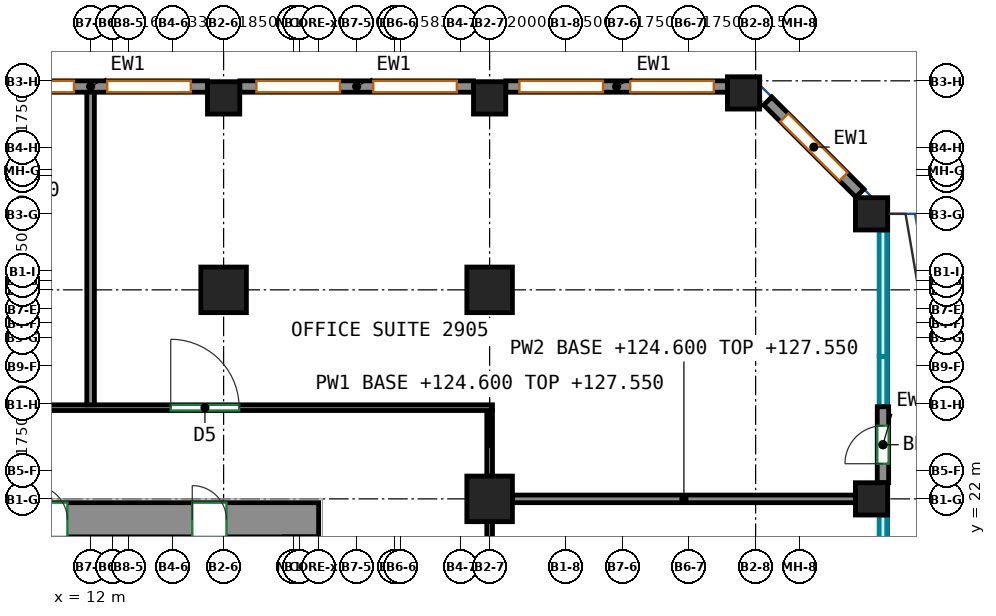
"""IFC4 building model, lengths in metres.
Left out: names, types, materials, properties, quantities, classifications, styles, units other than length and angle.
Written with IfcOpenShell. Run it as: python <this file> out.ifc"""

import sys

from ifc_helpers import new_model, si_unit, direction, frame, frame_2d, origin, origin_2d, place, context, subcontext, project, spatial, rectangle, extrude, source, transform, mapped, element, fill, save


model = new_model("IFC4")
c1 = context("Model", 3, precision=1e-05, world=origin(), true_north=direction((0.0, 1.0)))
c2 = subcontext(c1, "Body", "Model", "MODEL_VIEW")
j1 = project(units=[si_unit("LENGTHUNIT", "METRE"), si_unit("PLANEANGLEUNIT", "RADIAN")], contexts=[c1])
p1 = place(None, origin())
s1 = spatial("IfcSite", under=j1, at=p1, CompositionType="ELEMENT")
p2 = place(p1, origin())
s2 = spatial("IfcBuilding", under=s1, at=p2, CompositionType="ELEMENT")
p3 = place(p2, frame((0.0, 0.0, 124.6)))
s3 = spatial("IfcBuildingStorey", under=s2, at=p3, CompositionType="ELEMENT", Elevation=124.6)
m1 = source(origin(), c2, "Body", "SweptSolid", [
    extrude(rectangle(XDim=1.2, YDim=1.2, at=origin_2d()), origin(), (0.0, 0.0, 1.0), 3.6),
])
p4 = place(p3, frame((15.5, 27.5, 0.0), z_axis=(0.0, 0.0, 1.0), x_axis=(1.0, 0.0, 0.0)))
e1 = element("IfcColumn", 1, at=p4, inside=s3, PredefinedType="COLUMN", context=c2, shape_type="MappedRepresentation", body=[
    mapped(m1, transform((0.0, 0.0, 0.0))),
])
m2 = source(origin(), c2, "Body", "SweptSolid", [
    extrude(rectangle(XDim=0.85, YDim=0.85, at=origin_2d()), origin(), (0.0, 0.0, 1.0), 3.6),
])
p5 = place(p3, frame((15.5, 32.55, 0.0), z_axis=(0.0, 0.0, 1.0), x_axis=(1.0, 0.0, 0.0)))
e2 = element("IfcColumn", 2, at=p5, inside=s3, PredefinedType="COLUMN", context=c2, shape_type="MappedRepresentation", body=[
    mapped(m2, transform((0.0, 0.0, 0.0))),
])
for number, where, z_axis, x_axis in (
    (3, (22.5, 22.0, 0.0), (0.0, 0.0, 1.0), (1.0, 0.0, 0.0)),
    (4, (22.5, 27.5, 0.0), (0.0, 0.0, 1.0), (1.0, 0.0, 0.0)),
):
    element("IfcColumn", number, at=place(p3, frame(where, z_axis=z_axis, x_axis=x_axis)), inside=s3, PredefinedType="COLUMN", context=c2, shape_type="MappedRepresentation", body=[
        mapped(m1, transform((0.0, 0.0, 0.0))),
    ])
for number, where, z_axis, x_axis in (
    (5, (22.5, 32.55, 0.0), (0.0, 0.0, 1.0), (1.0, 0.0, 0.0)),
    (6, (29.182, 32.682, 0.0), (0.0, 0.0, 1.0), (1.0, 0.0, 0.0)),
    (7, (32.55, 22.0, 0.0), (0.0, 0.0, 1.0), (1.0, 0.0, 0.0)),
    (8, (32.55, 29.5, 0.0), (0.0, 0.0, 1.0), (1.0, 0.0, 0.0)),
):
    element("IfcColumn", number, at=place(p3, frame(where, z_axis=z_axis, x_axis=x_axis)), inside=s3, PredefinedType="COLUMN", context=c2, shape_type="MappedRepresentation", body=[
        mapped(m2, transform((0.0, 0.0, 0.0))),
    ])
m3 = source(origin(), c2, "Body", "SweptSolid", [
    extrude(rectangle(XDim=33.9, YDim=0.9, at=frame_2d((16.95, 0.0))), origin(), (0.0, 0.0, 1.0), 3.6),
])
p6 = place(p3, frame((-15.9, 21.45, 0.0), z_axis=(0.0, 0.0, 1.0), x_axis=(1.0, 0.0, 0.0)))
e9 = element("IfcWall", 9, at=p6, inside=s3, PredefinedType="SHEAR", context=c2, shape_type="MappedRepresentation", body=[
    mapped(m3, transform((0.0, 0.0, 0.0))),
])
p7 = place(p6, frame((6.008, 0.0, 0.0)))
e10 = element("IfcOpeningElement", 10, at=p7, cuts=e9, PredefinedType="OPENING", context=c2, shape_type="SweptSolid", body=[
    extrude(rectangle(XDim=0.9, YDim=2.1, at=frame_2d((0.45, 1.05))), frame((0.0, 0.46, 0.0), z_axis=(0.0, -1.0, 0.0), x_axis=(1.0, 0.0, 0.0)), (0.0, 0.0, 1.0), 0.92),
])
p8 = place(p6, frame((8.688, 0.0, 0.0)))
e11 = element("IfcOpeningElement", 11, at=p8, cuts=e9, PredefinedType="OPENING", context=c2, shape_type="SweptSolid", body=[
    extrude(rectangle(XDim=0.9, YDim=2.1, at=frame_2d((0.45, 1.05))), frame((0.0, 0.46, 0.0), z_axis=(0.0, -1.0, 0.0), x_axis=(1.0, 0.0, 0.0)), (0.0, 0.0, 1.0), 0.92),
])
p9 = place(p6, frame((12.185, 0.0, 0.0)))
e12 = element("IfcOpeningElement", 12, at=p9, cuts=e9, PredefinedType="OPENING", context=c2, shape_type="SweptSolid", body=[
    extrude(rectangle(XDim=0.9, YDim=2.1, at=frame_2d((0.45, 1.05))), frame((0.0, 0.46, 0.0), z_axis=(0.0, -1.0, 0.0), x_axis=(1.0, 0.0, 0.0)), (0.0, 0.0, 1.0), 0.92),
])
p10 = place(p6, frame((16.138, 0.0, 0.0)))
e13 = element("IfcOpeningElement", 13, at=p10, cuts=e9, PredefinedType="OPENING", context=c2, shape_type="SweptSolid", body=[
    extrude(rectangle(XDim=0.9, YDim=2.1, at=frame_2d((0.45, 1.05))), frame((0.0, 0.46, 0.0), z_axis=(0.0, -1.0, 0.0), x_axis=(1.0, 0.0, 0.0)), (0.0, 0.0, 1.0), 0.92),
])
p11 = place(p6, frame((20.962, 0.0, 0.0)))
e14 = element("IfcOpeningElement", 14, at=p11, cuts=e9, PredefinedType="OPENING", context=c2, shape_type="SweptSolid", body=[
    extrude(rectangle(XDim=0.9, YDim=2.1, at=frame_2d((0.45, 1.05))), frame((0.0, 0.46, 0.0), z_axis=(0.0, -1.0, 0.0), x_axis=(1.0, 0.0, 0.0)), (0.0, 0.0, 1.0), 0.92),
])
p12 = place(p6, frame((26.389, 0.0, 0.0)))
e15 = element("IfcOpeningElement", 15, at=p12, cuts=e9, PredefinedType="OPENING", context=c2, shape_type="SweptSolid", body=[
    extrude(rectangle(XDim=0.9, YDim=2.1, at=frame_2d((0.45, 1.05))), frame((0.0, 0.46, 0.0), z_axis=(0.0, -1.0, 0.0), x_axis=(1.0, 0.0, 0.0)), (0.0, 0.0, 1.0), 0.92),
])
p13 = place(p6, frame((2.425, 0.0, 0.0)))
e16 = element("IfcOpeningElement", 16, at=p13, cuts=e9, PredefinedType="OPENING", context=c2, shape_type="SweptSolid", body=[
    extrude(rectangle(XDim=0.9, YDim=2.1, at=frame_2d((0.45, 1.05))), frame((0.0, 0.46, 0.0), z_axis=(0.0, -1.0, 0.0), x_axis=(1.0, 0.0, 0.0)), (0.0, 0.0, 1.0), 0.92),
])
p14 = place(p6, frame((30.575, 0.0, 0.0)))
e17 = element("IfcOpeningElement", 17, at=p14, cuts=e9, PredefinedType="OPENING", context=c2, shape_type="SweptSolid", body=[
    extrude(rectangle(XDim=0.9, YDim=2.1, at=frame_2d((0.45, 1.05))), frame((0.0, 0.46, 0.0), z_axis=(0.0, -1.0, 0.0), x_axis=(1.0, 0.0, 0.0)), (0.0, 0.0, 1.0), 0.92),
])
m4 = source(origin(), c2, "Body", "SweptSolid", [
    extrude(rectangle(XDim=2.0, YDim=0.3, at=frame_2d((1.0, 0.0))), origin(), (0.0, 0.0, 1.0), 3.6),
])
p15 = place(p3, frame((32.85, 22.425, 0.0), z_axis=(0.0, 0.0, 1.0), x_axis=(0.0, 1.0, 0.0)))
e18 = element("IfcWall", 18, at=p15, inside=s3, PredefinedType="SOLIDWALL", context=c2, shape_type="MappedRepresentation", body=[
    mapped(m4, transform((0.0, 0.0, 0.0))),
])
p16 = place(p15, frame((0.5, 0.0, 0.0)))
e19 = element("IfcOpeningElement", 19, at=p16, cuts=e18, PredefinedType="OPENING", context=c2, shape_type="SweptSolid", body=[
    extrude(rectangle(XDim=1.0, YDim=2.1, at=frame_2d((0.5, 1.05))), frame((0.0, 0.16, 0.0), z_axis=(0.0, -1.0, 0.0), x_axis=(1.0, 0.0, 0.0)), (0.0, 0.0, 1.0), 0.32),
])
m5 = source(origin(), c2, "Body", "SweptSolid", [
    extrude(rectangle(XDim=3.429, YDim=0.3, at=frame_2d((1.715, 0.0))), origin(), (0.0, 0.0, 1.0), 3.6),
])
p17 = place(p3, frame((32.244, 30.044, 0.0), z_axis=(0.0, 0.0, 1.0), x_axis=(-0.707106781187, 0.707106781187, 0.0)))
e20 = element("IfcWall", 20, at=p17, inside=s3, PredefinedType="SOLIDWALL", context=c2, shape_type="MappedRepresentation", body=[
    mapped(m5, transform((0.0, 0.0, 0.0))),
])
p18 = place(p17, frame((0.615, 0.0, 0.7)))
e21 = element("IfcOpeningElement", 21, at=p18, cuts=e20, PredefinedType="OPENING", context=c2, shape_type="SweptSolid", body=[
    extrude(rectangle(XDim=2.2, YDim=2.25, at=frame_2d((1.1, 1.125))), frame((0.0, 0.16, 0.0), z_axis=(0.0, -1.0, 0.0), x_axis=(1.0, 0.0, 0.0)), (0.0, 0.0, 1.0), 0.32),
])
m6 = source(origin(), c2, "Body", "SweptSolid", [
    extrude(rectangle(XDim=5.832, YDim=0.3, at=frame_2d((2.916, 0.0))), origin(), (0.0, 0.0, 1.0), 3.6),
])
p19 = place(p3, frame((28.757, 32.85, 0.0), z_axis=(0.0, 0.0, 1.0), x_axis=(-1.0, 0.0, 0.0)))
e22 = element("IfcWall", 22, at=p19, inside=s3, PredefinedType="SOLIDWALL", context=c2, shape_type="MappedRepresentation", body=[
    mapped(m6, transform((0.0, 0.0, 0.0))),
])
p20 = place(p19, frame((0.358, 0.0, 0.7)))
e23 = element("IfcOpeningElement", 23, at=p20, cuts=e22, PredefinedType="OPENING", context=c2, shape_type="SweptSolid", body=[
    extrude(rectangle(XDim=2.2, YDim=2.25, at=frame_2d((1.1, 1.125))), frame((0.0, 0.16, 0.0), z_axis=(0.0, -1.0, 0.0), x_axis=(1.0, 0.0, 0.0)), (0.0, 0.0, 1.0), 0.32),
])
p21 = place(p19, frame((3.274, 0.0, 0.7)))
e24 = element("IfcOpeningElement", 24, at=p21, cuts=e22, PredefinedType="OPENING", context=c2, shape_type="SweptSolid", body=[
    extrude(rectangle(XDim=2.2, YDim=2.25, at=frame_2d((1.1, 1.125))), frame((0.0, 0.16, 0.0), z_axis=(0.0, -1.0, 0.0), x_axis=(1.0, 0.0, 0.0)), (0.0, 0.0, 1.0), 0.32),
])
m7 = source(origin(), c2, "Body", "SweptSolid", [
    extrude(rectangle(XDim=6.15, YDim=0.3, at=frame_2d((3.075, 0.0))), origin(), (0.0, 0.0, 1.0), 3.6),
])
p22 = place(p3, frame((22.075, 32.85, 0.0), z_axis=(0.0, 0.0, 1.0), x_axis=(-1.0, 0.0, 0.0)))
e25 = element("IfcWall", 25, at=p22, inside=s3, PredefinedType="SOLIDWALL", context=c2, shape_type="MappedRepresentation", body=[
    mapped(m7, transform((0.0, 0.0, 0.0))),
])
p23 = place(p22, frame((0.438, 0.0, 0.7)))
e26 = element("IfcOpeningElement", 26, at=p23, cuts=e25, PredefinedType="OPENING", context=c2, shape_type="SweptSolid", body=[
    extrude(rectangle(XDim=2.2, YDim=2.25, at=frame_2d((1.1, 1.125))), frame((0.0, 0.16, 0.0), z_axis=(0.0, -1.0, 0.0), x_axis=(1.0, 0.0, 0.0)), (0.0, 0.0, 1.0), 0.32),
])
p24 = place(p22, frame((3.512, 0.0, 0.7)))
e27 = element("IfcOpeningElement", 27, at=p24, cuts=e25, PredefinedType="OPENING", context=c2, shape_type="SweptSolid", body=[
    extrude(rectangle(XDim=2.2, YDim=2.25, at=frame_2d((1.1, 1.125))), frame((0.0, 0.16, 0.0), z_axis=(0.0, -1.0, 0.0), x_axis=(1.0, 0.0, 0.0)), (0.0, 0.0, 1.0), 0.32),
])
p25 = place(p3, frame((15.075, 32.85, 0.0), z_axis=(0.0, 0.0, 1.0), x_axis=(-1.0, 0.0, 0.0)))
e28 = element("IfcWall", 28, at=p25, inside=s3, PredefinedType="SOLIDWALL", context=c2, shape_type="MappedRepresentation", body=[
    mapped(m7, transform((0.0, 0.0, 0.0))),
])
p26 = place(p25, frame((0.438, 0.0, 0.7)))
e29 = element("IfcOpeningElement", 29, at=p26, cuts=e28, PredefinedType="OPENING", context=c2, shape_type="SweptSolid", body=[
    extrude(rectangle(XDim=2.2, YDim=2.25, at=frame_2d((1.1, 1.125))), frame((0.0, 0.16, 0.0), z_axis=(0.0, -1.0, 0.0), x_axis=(1.0, 0.0, 0.0)), (0.0, 0.0, 1.0), 0.32),
])
p27 = place(p25, frame((3.512, 0.0, 0.7)))
e30 = element("IfcOpeningElement", 30, at=p27, cuts=e28, PredefinedType="OPENING", context=c2, shape_type="SweptSolid", body=[
    extrude(rectangle(XDim=2.2, YDim=2.25, at=frame_2d((1.1, 1.125))), frame((0.0, 0.16, 0.0), z_axis=(0.0, -1.0, 0.0), x_axis=(1.0, 0.0, 0.0)), (0.0, 0.0, 1.0), 0.32),
])
p28 = place(p3, frame((22.5, 17.65, 0.0), z_axis=(0.0, 0.0, 1.0), x_axis=(0.0, 1.0, 0.0)))
e31 = element("IfcWall", 31, at=p28, inside=s3, PredefinedType="PARTITIONING", context=c2, shape_type="SweptSolid", body=[
    extrude(rectangle(XDim=3.75, YDim=0.15, at=frame_2d((1.875, 0.0))), origin(), (0.0, 0.0, 1.0), 2.95),
])
p29 = place(p28, frame((0.933, 0.0, 0.0)))
e32 = element("IfcOpeningElement", 32, at=p29, cuts=e31, PredefinedType="OPENING", context=c2, shape_type="SweptSolid", body=[
    extrude(rectangle(XDim=1.0, YDim=2.1, at=frame_2d((0.5, 1.05))), frame((0.0, 0.085, 0.0), z_axis=(0.0, -1.0, 0.0), x_axis=(1.0, 0.0, 0.0)), (0.0, 0.0, 1.0), 0.17),
])
p30 = place(p3, frame((22.5, 22.6, 0.0), z_axis=(0.0, 0.0, 1.0), x_axis=(0.0, 1.0, 0.0)))
e33 = element("IfcWall", 33, at=p30, inside=s3, PredefinedType="PARTITIONING", context=c2, shape_type="SweptSolid", body=[
    extrude(rectangle(XDim=1.725, YDim=0.15, at=frame_2d((0.862, 0.0))), origin(), (0.0, 0.0, 1.0), 2.95),
])
p31 = place(p3, frame((-19.6, 24.4, 0.0), z_axis=(0.0, 0.0, 1.0), x_axis=(1.0, 0.0, 0.0)))
e34 = element("IfcWall", 34, at=p31, inside=s3, PredefinedType="PARTITIONING", context=c2, shape_type="SweptSolid", body=[
    extrude(rectangle(XDim=42.175, YDim=0.15, at=frame_2d((21.087, 0.0))), origin(), (0.0, 0.0, 1.0), 3.6),
])
p32 = place(p31, frame((4.207, 0.0, 0.0)))
e35 = element("IfcOpeningElement", 35, at=p32, cuts=e34, PredefinedType="OPENING", context=c2, shape_type="SweptSolid", body=[
    extrude(rectangle(XDim=0.9, YDim=2.1, at=frame_2d((0.45, 1.05))), frame((0.0, 0.085, 0.0), z_axis=(0.0, -1.0, 0.0), x_axis=(1.0, 0.0, 0.0)), (0.0, 0.0, 1.0), 0.17),
])
p33 = place(p31, frame((8.996, 0.0, 0.0)))
e36 = element("IfcOpeningElement", 36, at=p33, cuts=e34, PredefinedType="OPENING", context=c2, shape_type="SweptSolid", body=[
    extrude(rectangle(XDim=0.9, YDim=2.1, at=frame_2d((0.45, 1.05))), frame((0.0, 0.085, 0.0), z_axis=(0.0, -1.0, 0.0), x_axis=(1.0, 0.0, 0.0)), (0.0, 0.0, 1.0), 0.17),
])
p34 = place(p31, frame((14.691, 0.0, 0.0)))
e37 = element("IfcOpeningElement", 37, at=p34, cuts=e34, PredefinedType="OPENING", context=c2, shape_type="SweptSolid", body=[
    extrude(rectangle(XDim=0.9, YDim=2.1, at=frame_2d((0.45, 1.05))), frame((0.0, 0.085, 0.0), z_axis=(0.0, -1.0, 0.0), x_axis=(1.0, 0.0, 0.0)), (0.0, 0.0, 1.0), 0.17),
])
p35 = place(p31, frame((27.504, 0.0, 0.0)))
e38 = element("IfcOpeningElement", 38, at=p35, cuts=e34, PredefinedType="OPENING", context=c2, shape_type="SweptSolid", body=[
    extrude(rectangle(XDim=1.0, YDim=2.1, at=frame_2d((0.5, 1.05))), frame((0.0, 0.085, 0.0), z_axis=(0.0, -1.0, 0.0), x_axis=(1.0, 0.0, 0.0)), (0.0, 0.0, 1.0), 0.17),
])
p36 = place(p31, frame((33.709, 0.0, 0.0)))
e39 = element("IfcOpeningElement", 39, at=p36, cuts=e34, PredefinedType="OPENING", context=c2, shape_type="SweptSolid", body=[
    extrude(rectangle(XDim=1.8, YDim=2.1, at=frame_2d((0.9, 1.05))), frame((0.0, 0.085, 0.0), z_axis=(0.0, -1.0, 0.0), x_axis=(1.0, 0.0, 0.0)), (0.0, 0.0, 1.0), 0.17),
])
p37 = place(p3, frame((23.1, 22.0, 0.0), z_axis=(0.0, 0.0, 1.0), x_axis=(1.0, 0.0, 0.0)))
e40 = element("IfcWall", 40, at=p37, inside=s3, PredefinedType="PARTITIONING", context=c2, shape_type="SweptSolid", body=[
    extrude(rectangle(XDim=9.025, YDim=0.2, at=frame_2d((4.512, 0.0))), origin(), (0.0, 0.0, 1.0), 2.95),
])
p38 = place(p3, frame((12.0, 24.476, 0.0), z_axis=(0.0, 0.0, 1.0), x_axis=(0.0, 1.0, 0.0)))
e41 = element("IfcWall", 41, at=p38, inside=s3, PredefinedType="PARTITIONING", context=c2, shape_type="SweptSolid", body=[
    extrude(rectangle(XDim=8.274, YDim=0.2, at=frame_2d((4.137, 0.0))), origin(), (0.0, 0.0, 1.0), 3.6),
])
p39 = place(p16, origin())
e42 = element("IfcDoor", 42, at=p39, inside=s3, OperationType="SINGLE_SWING_LEFT", PredefinedType="DOOR", context=c2, shape_type="SweptSolid", body=[
    extrude(rectangle(XDim=1.0, YDim=2.1, at=frame_2d((0.5, 1.05))), frame((0.0, 0.025, 0.0), z_axis=(0.0, -1.0, 0.0), x_axis=(1.0, 0.0, 0.0)), (0.0, 0.0, 1.0), 0.05),
])
fill(e19, e42)
p40 = place(p18, origin())
e43 = element("IfcWindow", 43, at=p40, inside=s3, PartitioningType="SINGLE_PANEL", PredefinedType="WINDOW", context=c2, shape_type="SweptSolid", body=[
    extrude(rectangle(XDim=2.2, YDim=2.25, at=frame_2d((1.1, 1.125))), frame((0.0, 0.03, 0.0), z_axis=(0.0, -1.0, 0.0), x_axis=(1.0, 0.0, 0.0)), (0.0, 0.0, 1.0), 0.06),
])
fill(e21, e43)
p41 = place(p20, origin())
e44 = element("IfcWindow", 44, at=p41, inside=s3, PartitioningType="SINGLE_PANEL", PredefinedType="WINDOW", context=c2, shape_type="SweptSolid", body=[
    extrude(rectangle(XDim=2.2, YDim=2.25, at=frame_2d((1.1, 1.125))), frame((0.0, 0.03, 0.0), z_axis=(0.0, -1.0, 0.0), x_axis=(1.0, 0.0, 0.0)), (0.0, 0.0, 1.0), 0.06),
])
fill(e23, e44)
p42 = place(p21, origin())
e45 = element("IfcWindow", 45, at=p42, inside=s3, PartitioningType="SINGLE_PANEL", PredefinedType="WINDOW", context=c2, shape_type="SweptSolid", body=[
    extrude(rectangle(XDim=2.2, YDim=2.25, at=frame_2d((1.1, 1.125))), frame((0.0, 0.03, 0.0), z_axis=(0.0, -1.0, 0.0), x_axis=(1.0, 0.0, 0.0)), (0.0, 0.0, 1.0), 0.06),
])
fill(e24, e45)
p43 = place(p23, origin())
e46 = element("IfcWindow", 46, at=p43, inside=s3, PartitioningType="SINGLE_PANEL", PredefinedType="WINDOW", context=c2, shape_type="SweptSolid", body=[
    extrude(rectangle(XDim=2.2, YDim=2.25, at=frame_2d((1.1, 1.125))), frame((0.0, 0.03, 0.0), z_axis=(0.0, -1.0, 0.0), x_axis=(1.0, 0.0, 0.0)), (0.0, 0.0, 1.0), 0.06),
])
fill(e26, e46)
p44 = place(p24, origin())
e47 = element("IfcWindow", 47, at=p44, inside=s3, PartitioningType="SINGLE_PANEL", PredefinedType="WINDOW", context=c2, shape_type="SweptSolid", body=[
    extrude(rectangle(XDim=2.2, YDim=2.25, at=frame_2d((1.1, 1.125))), frame((0.0, 0.03, 0.0), z_axis=(0.0, -1.0, 0.0), x_axis=(1.0, 0.0, 0.0)), (0.0, 0.0, 1.0), 0.06),
])
fill(e27, e47)
p45 = place(p26, origin())
e48 = element("IfcWindow", 48, at=p45, inside=s3, PartitioningType="SINGLE_PANEL", PredefinedType="WINDOW", context=c2, shape_type="SweptSolid", body=[
    extrude(rectangle(XDim=2.2, YDim=2.25, at=frame_2d((1.1, 1.125))), frame((0.0, 0.03, 0.0), z_axis=(0.0, -1.0, 0.0), x_axis=(1.0, 0.0, 0.0)), (0.0, 0.0, 1.0), 0.06),
])
fill(e29, e48)
p46 = place(p27, origin())
e49 = element("IfcWindow", 49, at=p46, inside=s3, PartitioningType="SINGLE_PANEL", PredefinedType="WINDOW", context=c2, shape_type="SweptSolid", body=[
    extrude(rectangle(XDim=2.2, YDim=2.25, at=frame_2d((1.1, 1.125))), frame((0.0, 0.03, 0.0), z_axis=(0.0, -1.0, 0.0), x_axis=(1.0, 0.0, 0.0)), (0.0, 0.0, 1.0), 0.06),
])
fill(e30, e49)
p47 = place(p12, origin())
e50 = element("IfcDoor", 50, at=p47, inside=s3, OperationType="SINGLE_SWING_LEFT", PredefinedType="DOOR", context=c2, shape_type="SweptSolid", body=[
    extrude(rectangle(XDim=0.9, YDim=2.1, at=frame_2d((0.45, 1.05))), frame((0.0, -0.305, 0.0), z_axis=(0.0, -1.0, 0.0), x_axis=(1.0, 0.0, 0.0)), (0.0, 0.0, 1.0), 0.05),
])
fill(e15, e50)
p48 = place(p14, origin())
e51 = element("IfcDoor", 51, at=p48, inside=s3, OperationType="SINGLE_SWING_LEFT", PredefinedType="DOOR", context=c2, shape_type="SweptSolid", body=[
    extrude(rectangle(XDim=0.9, YDim=2.1, at=frame_2d((0.45, 1.05))), frame((0.0, -0.305, 0.0), z_axis=(0.0, -1.0, 0.0), x_axis=(1.0, 0.0, 0.0)), (0.0, 0.0, 1.0), 0.05),
])
fill(e17, e51)
p49 = place(p36, origin())
e52 = element("IfcDoor", 52, at=p49, inside=s3, OperationType="DOUBLE_DOOR_SINGLE_SWING", PredefinedType="DOOR", context=c2, shape_type="SweptSolid", body=[
    extrude(rectangle(XDim=1.8, YDim=2.1, at=frame_2d((0.9, 1.05))), frame((0.0, 0.025, 0.0), z_axis=(0.0, -1.0, 0.0), x_axis=(1.0, 0.0, 0.0)), (0.0, 0.0, 1.0), 0.05),
])
fill(e39, e52)
save(model, sys.argv[1])
